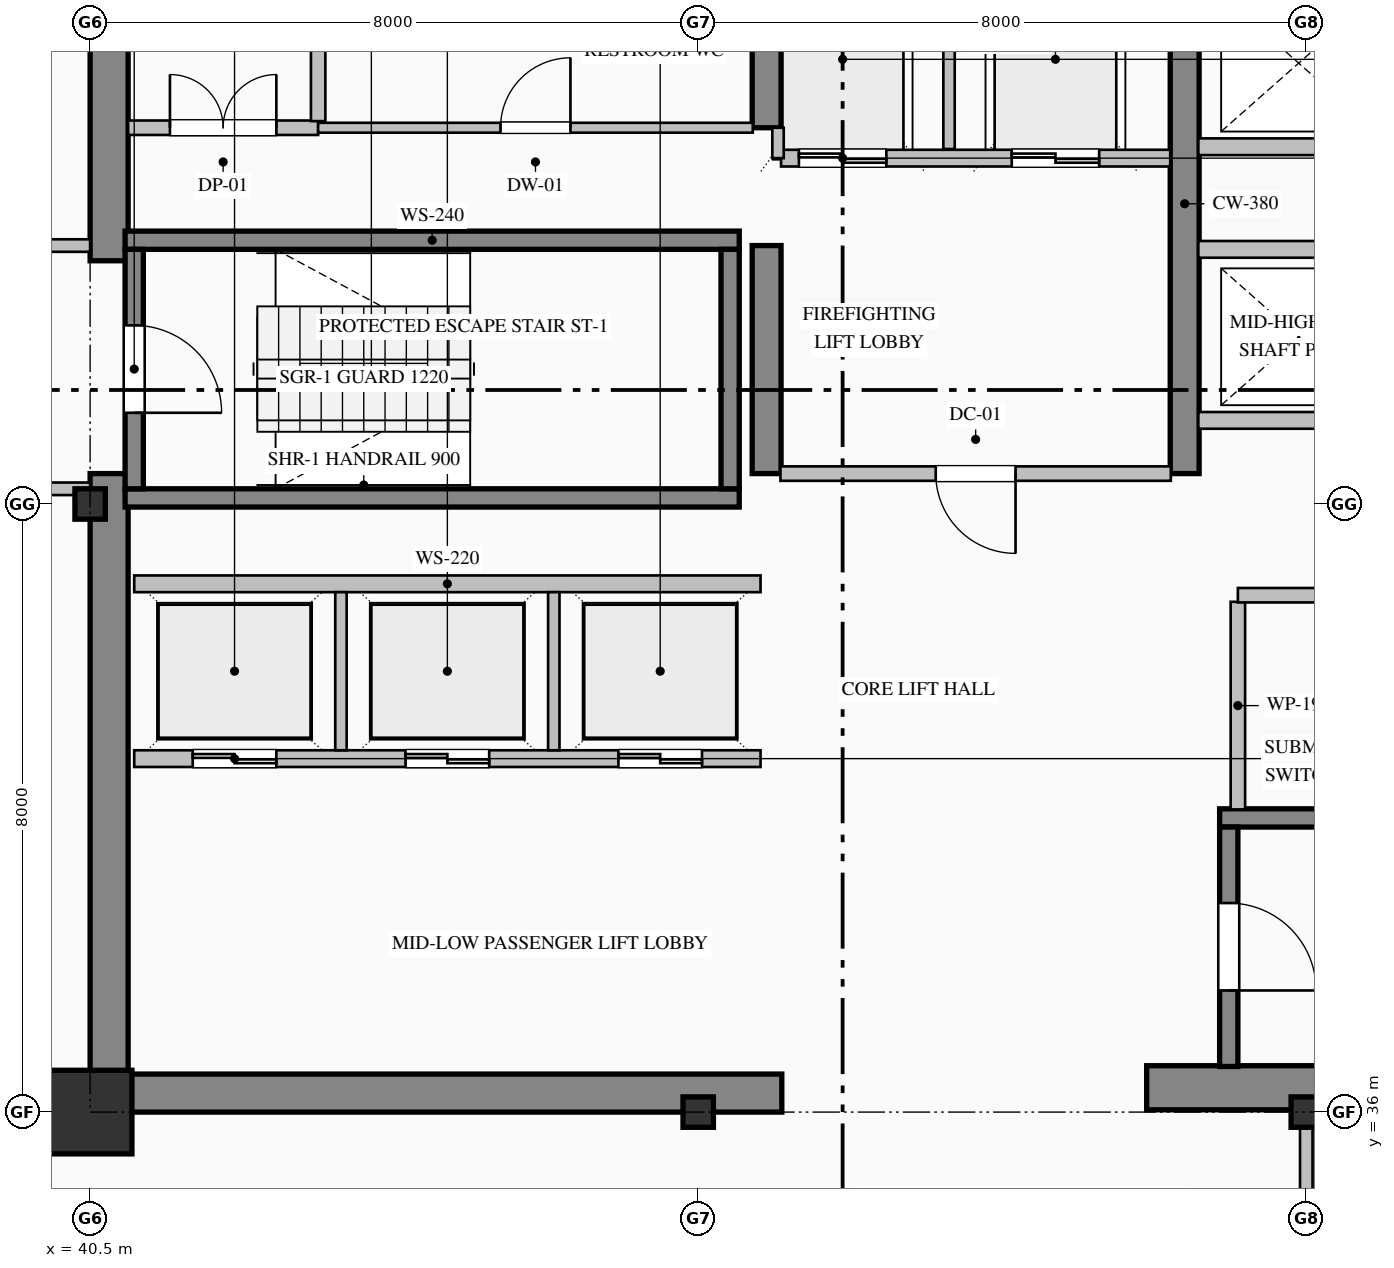
"""IFC4 building model, lengths in metres.
Left out: names, types, materials, properties, quantities, classifications, styles, units other than length and angle.
Written with IfcOpenShell. Run it as: python <this file> out.ifc"""

import sys

from ifc_helpers import new_model, si_unit, direction, frame, frame_2d, origin, origin_2d, place, context, subcontext, project, spatial, rectangle, hollow_rectangle, i_section, extrude, element, fill, save


model = new_model("IFC4")
c1 = context("Model", 3, precision=1e-05, world=origin(), true_north=direction((0.0, 1.0)))
c2 = subcontext(c1, "Body", "Model", "MODEL_VIEW")
j1 = project(units=[si_unit("LENGTHUNIT", "METRE"), si_unit("PLANEANGLEUNIT", "RADIAN")], contexts=[c1])
p1 = place(None, origin())
s1 = spatial("IfcSite", under=j1, at=p1, CompositionType="ELEMENT")
p2 = place(p1, origin())
s2 = spatial("IfcBuilding", under=s1, at=p2, CompositionType="ELEMENT")
p3 = place(p2, frame((0.0, 0.0, 147.0)))
s3 = spatial("IfcBuildingStorey", under=s2, at=p3, CompositionType="ELEMENT", Elevation=147.0)
p4 = place(p3, frame((40.75, 36.5, 0.0), z_axis=(0.0, 0.0, 1.0), x_axis=(0.0, 1.0, 0.0)))
e1 = element("IfcWall", 1, at=p4, inside=s3, PredefinedType="SHEAR", context=c2, shape_type="SweptSolid", body=[
    extrude(rectangle(XDim=7.9, YDim=0.5, at=frame_2d((3.95, 0.0))), origin(), (0.0, 0.0, 1.0), 3.765),
])
p5 = place(p3, frame((40.75, 47.2, 0.0), z_axis=(0.0, 0.0, 1.0), x_axis=(0.0, 1.0, 0.0)))
e2 = element("IfcWall", 2, at=p5, inside=s3, PredefinedType="SHEAR", context=c2, shape_type="SweptSolid", body=[
    extrude(rectangle(XDim=4.3, YDim=0.5, at=frame_2d((2.15, 0.0))), origin(), (0.0, 0.0, 1.0), 3.765),
])
p6 = place(p3, frame((40.5, 36.25, 0.0), z_axis=(0.0, 0.0, 1.0), x_axis=(1.0, 0.0, 0.0)))
e3 = element("IfcWall", 3, at=p6, inside=s3, PredefinedType="SHEAR", context=c2, shape_type="SweptSolid", body=[
    extrude(rectangle(XDim=9.1, YDim=0.5, at=frame_2d((4.55, 0.0))), origin(), (0.0, 0.0, 1.0), 3.765),
])
p7 = place(p3, frame((54.4, 36.32, 0.0), z_axis=(0.0, 0.0, 1.0), x_axis=(1.0, 0.0, 0.0)))
e4 = element("IfcWall", 4, at=p7, inside=s3, PredefinedType="SHEAR", context=c2, shape_type="SweptSolid", body=[
    extrude(rectangle(XDim=9.6, YDim=0.58, at=frame_2d((4.8, 0.0))), origin(), (0.0, 0.0, 1.0), 4.0),
])
p8 = place(p3, frame((49.4, 44.4, 0.0), z_axis=(0.0, 0.0, 1.0), x_axis=(0.0, 1.0, 0.0)))
e5 = element("IfcWall", 5, at=p8, inside=s3, PredefinedType="SHEAR", context=c2, shape_type="SweptSolid", body=[
    extrude(rectangle(XDim=3.0, YDim=0.38, at=frame_2d((1.5, 0.0))), origin(), (0.0, 0.0, 1.0), 3.765),
])
p9 = place(p3, frame((49.4, 48.95, 0.0), z_axis=(0.0, 0.0, 1.0), x_axis=(0.0, 1.0, 0.0)))
e6 = element("IfcWall", 6, at=p9, inside=s3, PredefinedType="SHEAR", context=c2, shape_type="SweptSolid", body=[
    extrude(rectangle(XDim=2.55, YDim=0.38, at=frame_2d((1.275, 0.0))), origin(), (0.0, 0.0, 1.0), 3.765),
])
p10 = place(p3, frame((54.9, 44.4, 0.0), z_axis=(0.0, 0.0, 1.0), x_axis=(0.0, 1.0, 0.0)))
e7 = element("IfcWall", 7, at=p10, inside=s3, PredefinedType="SHEAR", context=c2, shape_type="SweptSolid", body=[
    extrude(rectangle(XDim=7.1, YDim=0.38, at=frame_2d((3.55, 0.0))), origin(), (0.0, 0.0, 1.0), 3.765),
])
p11 = place(p3, frame((40.5, 36.0, 0.0), z_axis=(0.0, 0.0, 1.0), x_axis=(1.0, 0.0, 0.0)))
e8 = element("IfcColumn", 8, at=p11, inside=s3, PredefinedType="COLUMN", context=c2, shape_type="SweptSolid", body=[
    extrude(hollow_rectangle(XDim=1.1, YDim=1.1, WallThickness=0.04, at=origin_2d()), origin(), (0.0, 0.0, 1.0), 4.0),
])
for number, where, z_axis, x_axis in (
    (9, (40.5, 44.0, 0.0), (0.0, 0.0, 1.0), (1.0, 0.0, 0.0)),
    (10, (48.5, 36.0, 0.0), (0.0, 0.0, 1.0), (1.0, 0.0, 0.0)),
    (11, (56.5, 36.0, 0.0), (0.0, 0.0, 1.0), (1.0, 0.0, 0.0)),
):
    element("IfcColumn", number, at=place(p3, frame(where, z_axis=z_axis, x_axis=x_axis)), inside=s3, PredefinedType="COLUMN", context=c2, shape_type="SweptSolid", body=[
        extrude(i_section(OverallWidth=0.4, OverallDepth=0.4, WebThickness=0.013, FlangeThickness=0.021, FilletRadius=0.022, at=origin_2d()), origin(), (0.0, 0.0, 1.0), 4.0),
    ])
for number, where, z_axis, x_axis in (
    (12, (40.96, 47.47, 0.0), (0.0, 0.0, 1.0), (1.0, 0.0, 0.0)),
    (13, (49.04, 44.08, 0.0), (0.0, 0.0, 1.0), (-1.0, 0.0, 0.0)),
):
    element("IfcWall", number, at=place(p3, frame(where, z_axis=z_axis, x_axis=x_axis)), inside=s3, PredefinedType="SOLIDWALL", context=c2, shape_type="SweptSolid", body=[
        extrude(rectangle(XDim=8.08, YDim=0.24, at=frame_2d((4.04, 0.0))), origin(), (0.0, 0.0, 1.0), 4.0),
    ])
p12 = place(p3, frame((41.08, 47.35, 0.0), z_axis=(0.0, 0.0, 1.0), x_axis=(0.0, -1.0, 0.0)))
e14 = element("IfcWall", 14, at=p12, inside=s3, PredefinedType="SOLIDWALL", context=c2, shape_type="SweptSolid", body=[
    extrude(rectangle(XDim=3.15, YDim=0.24, at=frame_2d((1.575, 0.0))), origin(), (0.0, 0.0, 1.0), 4.0),
])
p13 = place(p12, frame((1.0, 0.0, 0.0)))
e15 = element("IfcOpeningElement", 15, at=p13, cuts=e14, PredefinedType="OPENING", context=c2, shape_type="SweptSolid", body=[
    extrude(rectangle(XDim=1.15, YDim=2.2, at=frame_2d((0.575, 1.1))), frame((0.0, 0.13, 0.0), z_axis=(0.0, -1.0, 0.0), x_axis=(1.0, 0.0, 0.0)), (0.0, 0.0, 1.0), 0.26),
])
p14 = place(p3, frame((48.92, 44.2, 0.0), z_axis=(0.0, 0.0, 1.0), x_axis=(0.0, 1.0, 0.0)))
e16 = element("IfcWall", 16, at=p14, inside=s3, PredefinedType="SOLIDWALL", context=c2, shape_type="SweptSolid", body=[
    extrude(rectangle(XDim=3.15, YDim=0.24, at=frame_2d((1.575, 0.0))), origin(), (0.0, 0.0, 1.0), 4.0),
])
p15 = place(p3, frame((55.36, 39.87, 0.0), z_axis=(0.0, 0.0, 1.0), x_axis=(1.0, 0.0, 0.0)))
e17 = element("IfcWall", 17, at=p15, inside=s3, PredefinedType="SOLIDWALL", context=c2, shape_type="SweptSolid", body=[
    extrude(rectangle(XDim=8.08, YDim=0.24, at=frame_2d((4.04, 0.0))), origin(), (0.0, 0.0, 1.0), 4.0),
])
p16 = place(p3, frame((55.48, 39.75, 0.0), z_axis=(0.0, 0.0, 1.0), x_axis=(0.0, -1.0, 0.0)))
e18 = element("IfcWall", 18, at=p16, inside=s3, PredefinedType="SOLIDWALL", context=c2, shape_type="SweptSolid", body=[
    extrude(rectangle(XDim=3.15, YDim=0.24, at=frame_2d((1.575, 0.0))), origin(), (0.0, 0.0, 1.0), 4.0),
])
p17 = place(p16, frame((1.0, 0.0, 0.0)))
e19 = element("IfcOpeningElement", 19, at=p17, cuts=e18, PredefinedType="OPENING", context=c2, shape_type="SweptSolid", body=[
    extrude(rectangle(XDim=1.15, YDim=2.2, at=frame_2d((0.575, 1.1))), frame((0.0, 0.13, 0.0), z_axis=(0.0, -1.0, 0.0), x_axis=(1.0, 0.0, 0.0)), (0.0, 0.0, 1.0), 0.26),
])
p18 = place(p3, frame((54.71, 48.55, 0.0), z_axis=(0.0, 0.0, 1.0), x_axis=(-1.0, 0.0, 0.0)))
e20 = element("IfcWall", 20, at=p18, inside=s3, PredefinedType="PARTITIONING", context=c2, shape_type="SweptSolid", body=[
    extrude(rectangle(XDim=5.12, YDim=0.22, at=frame_2d((2.56, 0.0))), origin(), (0.0, 0.0, 1.0), 3.765),
])
p19 = place(p18, frame((3.735, 0.0, 0.0)))
e21 = element("IfcOpeningElement", 21, at=p19, cuts=e20, PredefinedType="OPENING", context=c2, shape_type="SweptSolid", body=[
    extrude(rectangle(XDim=1.15, YDim=2.2, at=frame_2d((0.575, 1.1))), frame((0.0, 0.12, 0.0), z_axis=(0.0, -1.0, 0.0), x_axis=(1.0, 0.0, 0.0)), (0.0, 0.0, 1.0), 0.24),
])
p20 = place(p18, frame((0.935, 0.0, 0.0)))
e22 = element("IfcOpeningElement", 22, at=p20, cuts=e20, PredefinedType="OPENING", context=c2, shape_type="SweptSolid", body=[
    extrude(rectangle(XDim=1.15, YDim=2.2, at=frame_2d((0.575, 1.1))), frame((0.0, 0.12, 0.0), z_axis=(0.0, -1.0, 0.0), x_axis=(1.0, 0.0, 0.0)), (0.0, 0.0, 1.0), 0.24),
])
p21 = place(p3, frame((51.8, 48.67, 0.0), z_axis=(0.0, 0.0, 1.0), x_axis=(0.0, 1.0, 0.0)))
e23 = element("IfcWall", 23, at=p21, inside=s3, PredefinedType="PARTITIONING", context=c2, shape_type="SweptSolid", body=[
    extrude(rectangle(XDim=2.83, YDim=0.15, at=frame_2d((1.415, 0.0))), origin(), (0.0, 0.0, 1.0), 3.765),
])
p22 = place(p3, frame((49.55, 48.55, 0.0), z_axis=(0.0, 0.0, 1.0), x_axis=(0.0, 1.0, 0.0)))
e24 = element("IfcWall", 24, at=p22, inside=s3, PredefinedType="PARTITIONING", context=c2, shape_type="SweptSolid", body=[
    extrude(rectangle(XDim=0.4, YDim=0.15, at=frame_2d((0.2, 0.0))), origin(), (0.0, 0.0, 1.0), 3.765),
])
p23 = place(p3, frame((49.32, 40.65, 0.0), z_axis=(0.0, 0.0, 1.0), x_axis=(-1.0, 0.0, 0.0)))
e25 = element("IfcWall", 25, at=p23, inside=s3, PredefinedType="PARTITIONING", context=c2, shape_type="SweptSolid", body=[
    extrude(rectangle(XDim=8.24, YDim=0.22, at=frame_2d((4.12, 0.0))), origin(), (0.0, 0.0, 1.0), 3.765),
])
p24 = place(p23, frame((6.37, 0.0, 0.0)))
e26 = element("IfcOpeningElement", 26, at=p24, cuts=e25, PredefinedType="OPENING", context=c2, shape_type="SweptSolid", body=[
    extrude(rectangle(XDim=1.1, YDim=2.2, at=frame_2d((0.55, 1.1))), frame((0.0, 0.12, 0.0), z_axis=(0.0, -1.0, 0.0), x_axis=(1.0, 0.0, 0.0)), (0.0, 0.0, 1.0), 0.24),
])
p25 = place(p23, frame((3.57, 0.0, 0.0)))
e27 = element("IfcOpeningElement", 27, at=p25, cuts=e25, PredefinedType="OPENING", context=c2, shape_type="SweptSolid", body=[
    extrude(rectangle(XDim=1.1, YDim=2.2, at=frame_2d((0.55, 1.1))), frame((0.0, 0.12, 0.0), z_axis=(0.0, -1.0, 0.0), x_axis=(1.0, 0.0, 0.0)), (0.0, 0.0, 1.0), 0.24),
])
p26 = place(p23, frame((0.77, 0.0, 0.0)))
e28 = element("IfcOpeningElement", 28, at=p26, cuts=e25, PredefinedType="OPENING", context=c2, shape_type="SweptSolid", body=[
    extrude(rectangle(XDim=1.1, YDim=2.2, at=frame_2d((0.55, 1.1))), frame((0.0, 0.12, 0.0), z_axis=(0.0, -1.0, 0.0), x_axis=(1.0, 0.0, 0.0)), (0.0, 0.0, 1.0), 0.24),
])
p27 = place(p3, frame((41.08, 42.95, 0.0), z_axis=(0.0, 0.0, 1.0), x_axis=(1.0, 0.0, 0.0)))
e29 = element("IfcWall", 29, at=p27, inside=s3, PredefinedType="PARTITIONING", context=c2, shape_type="SweptSolid", body=[
    extrude(rectangle(XDim=8.24, YDim=0.22, at=frame_2d((4.12, 0.0))), origin(), (0.0, 0.0, 1.0), 3.765),
])
for number, where, z_axis, x_axis in (
    (30, (43.8, 40.76, 0.0), (0.0, 0.0, 1.0), (0.0, 1.0, 0.0)),
    (31, (46.6, 40.76, 0.0), (0.0, 0.0, 1.0), (0.0, 1.0, 0.0)),
):
    element("IfcWall", number, at=place(p3, frame(where, z_axis=z_axis, x_axis=x_axis)), inside=s3, PredefinedType="PARTITIONING", context=c2, shape_type="SweptSolid", body=[
        extrude(rectangle(XDim=2.08, YDim=0.15, at=frame_2d((1.04, 0.0))), origin(), (0.0, 0.0, 1.0), 3.765),
    ])
for number, where, z_axis, x_axis in (
    (32, (63.32, 45.1, 0.0), (0.0, 0.0, 1.0), (-1.0, 0.0, 0.0)),
    (33, (55.08, 47.35, 0.0), (0.0, 0.0, 1.0), (1.0, 0.0, 0.0)),
    (34, (63.32, 48.7, 0.0), (0.0, 0.0, 1.0), (-1.0, 0.0, 0.0)),
):
    element("IfcWall", number, at=place(p3, frame(where, z_axis=z_axis, x_axis=x_axis)), inside=s3, PredefinedType="PARTITIONING", context=c2, shape_type="SweptSolid", body=[
        extrude(rectangle(XDim=8.24, YDim=0.22, at=frame_2d((4.12, 0.0))), origin(), (0.0, 0.0, 1.0), 3.765),
    ])
p28 = place(p3, frame((37.8, 47.4, 0.0), z_axis=(0.0, 0.0, 1.0), x_axis=(1.0, 0.0, 0.0)))
e35 = element("IfcWall", 35, at=p28, inside=s3, PredefinedType="PARTITIONING", context=c2, shape_type="SweptSolid", body=[
    extrude(rectangle(XDim=2.7, YDim=0.165, at=frame_2d((1.35, 0.0))), origin(), (0.0, 0.0, 1.0), 3.765),
])
p29 = place(p28, frame((0.825, 0.0, 0.0)))
e36 = element("IfcOpeningElement", 36, at=p29, cuts=e35, PredefinedType="OPENING", context=c2, shape_type="SweptSolid", body=[
    extrude(rectangle(XDim=1.05, YDim=2.15, at=frame_2d((0.525, 1.075))), frame((0.0, 0.093, 0.0), z_axis=(0.0, -1.0, 0.0), x_axis=(1.0, 0.0, 0.0)), (0.0, 0.0, 1.0), 0.185),
])
p30 = place(p3, frame((40.5, 44.2, 0.0), z_axis=(0.0, 0.0, 1.0), x_axis=(-1.0, 0.0, 0.0)))
e37 = element("IfcWall", 37, at=p30, inside=s3, PredefinedType="PARTITIONING", context=c2, shape_type="SweptSolid", body=[
    extrude(rectangle(XDim=2.7, YDim=0.165, at=frame_2d((1.35, 0.0))), origin(), (0.0, 0.0, 1.0), 3.765),
])
p31 = place(p30, frame((0.825, 0.0, 0.0)))
e38 = element("IfcOpeningElement", 38, at=p31, cuts=e37, PredefinedType="OPENING", context=c2, shape_type="SweptSolid", body=[
    extrude(rectangle(XDim=1.05, YDim=2.15, at=frame_2d((0.525, 1.075))), frame((0.0, 0.093, 0.0), z_axis=(0.0, -1.0, 0.0), x_axis=(1.0, 0.0, 0.0)), (0.0, 0.0, 1.0), 0.185),
])
p32 = place(p3, frame((41.0, 48.95, 0.0), z_axis=(0.0, 0.0, 1.0), x_axis=(1.0, 0.0, 0.0)))
e39 = element("IfcWall", 39, at=p32, inside=s3, PredefinedType="PARTITIONING", context=c2, shape_type="SweptSolid", body=[
    extrude(rectangle(XDim=2.5, YDim=0.19, at=frame_2d((1.25, 0.0))), origin(), (0.0, 0.0, 1.0), 3.765),
])
p33 = place(p32, frame((0.55, 0.0, 0.0)))
e40 = element("IfcOpeningElement", 40, at=p33, cuts=e39, PredefinedType="OPENING", context=c2, shape_type="SweptSolid", body=[
    extrude(rectangle(XDim=1.4, YDim=2.25, at=frame_2d((0.7, 1.125))), frame((0.0, 0.105, 0.0), z_axis=(0.0, -1.0, 0.0), x_axis=(1.0, 0.0, 0.0)), (0.0, 0.0, 1.0), 0.21),
])
p34 = place(p3, frame((43.5, 48.95, 0.0), z_axis=(0.0, 0.0, 1.0), x_axis=(1.0, 0.0, 0.0)))
e41 = element("IfcWall", 41, at=p34, inside=s3, PredefinedType="PARTITIONING", context=c2, shape_type="SweptSolid", body=[
    extrude(rectangle(XDim=5.718, YDim=0.13, at=frame_2d((2.859, 0.0))), origin(), (0.0, 0.0, 1.0), 3.765),
])
p35 = place(p34, frame((2.399, 0.0, 0.0)))
e42 = element("IfcOpeningElement", 42, at=p35, cuts=e41, PredefinedType="OPENING", context=c2, shape_type="SweptSolid", body=[
    extrude(rectangle(XDim=0.92, YDim=2.15, at=frame_2d((0.46, 1.075))), frame((0.0, 0.075, 0.0), z_axis=(0.0, -1.0, 0.0), x_axis=(1.0, 0.0, 0.0)), (0.0, 0.0, 1.0), 0.15),
])
p36 = place(p3, frame((54.718, 44.4, 0.0), z_axis=(0.0, 0.0, 1.0), x_axis=(-1.0, 0.0, 0.0)))
e43 = element("IfcWall", 43, at=p36, inside=s3, PredefinedType="PARTITIONING", context=c2, shape_type="SweptSolid", body=[
    extrude(rectangle(XDim=5.136, YDim=0.19, at=frame_2d((2.568, 0.0))), origin(), (0.0, 0.0, 1.0), 3.765),
])
p37 = place(p36, frame((2.043, 0.0, 0.0)))
e44 = element("IfcOpeningElement", 44, at=p37, cuts=e43, PredefinedType="OPENING", context=c2, shape_type="SweptSolid", body=[
    extrude(rectangle(XDim=1.05, YDim=2.15, at=frame_2d((0.525, 1.075))), frame((0.0, 0.105, 0.0), z_axis=(0.0, -1.0, 0.0), x_axis=(1.0, 0.0, 0.0)), (0.0, 0.0, 1.0), 0.21),
])
p38 = place(p3, frame((55.6, 42.713, 0.0), z_axis=(0.0, 0.0, 1.0), x_axis=(0.0, -1.0, 0.0)))
e45 = element("IfcWall", 45, at=p38, inside=s3, PredefinedType="PARTITIONING", context=c2, shape_type="SweptSolid", body=[
    extrude(rectangle(XDim=2.731, YDim=0.19, at=frame_2d((1.365, 0.0))), origin(), (0.0, 0.0, 1.0), 3.765),
])
p39 = place(p3, frame((60.6, 42.8, 0.0), z_axis=(0.0, 0.0, 1.0), x_axis=(-1.0, 0.0, 0.0)))
e46 = element("IfcWall", 46, at=p39, inside=s3, PredefinedType="PARTITIONING", context=c2, shape_type="SweptSolid", body=[
    extrude(rectangle(XDim=5.0, YDim=0.19, at=frame_2d((2.5, 0.0))), origin(), (0.0, 0.0, 1.0), 3.765),
])
p40 = place(p39, frame((1.8, 0.0, 0.0)))
e47 = element("IfcOpeningElement", 47, at=p40, cuts=e46, PredefinedType="OPENING", context=c2, shape_type="SweptSolid", body=[
    extrude(rectangle(XDim=1.4, YDim=2.25, at=frame_2d((0.7, 1.125))), frame((0.0, 0.105, 0.0), z_axis=(0.0, -1.0, 0.0), x_axis=(1.0, 0.0, 0.0)), (0.0, 0.0, 1.0), 0.21),
])
p41 = place(p3, frame((43.5, 51.5, 0.0), z_axis=(0.0, 0.0, 1.0), x_axis=(0.0, -1.0, 0.0)))
e48 = element("IfcWall", 48, at=p41, inside=s3, PredefinedType="PARTITIONING", context=c2, shape_type="SweptSolid", body=[
    extrude(rectangle(XDim=2.463, YDim=0.19, at=frame_2d((1.231, 0.0))), origin(), (0.0, 0.0, 1.0), 3.765),
])
p42 = place(p3, frame((56.5, 36.0, 0.0), z_axis=(0.0, 0.0, 1.0), x_axis=(0.0, -1.0, 0.0)))
e49 = element("IfcWall", 49, at=p42, inside=s3, PredefinedType="PARTITIONING", context=c2, shape_type="SweptSolid", body=[
    extrude(rectangle(XDim=2.325, YDim=0.165, at=frame_2d((1.163, 0.0))), origin(), (0.0, 0.0, 1.0), 3.157),
])
p43 = place(p13, origin())
e50 = element("IfcDoor", 50, at=p43, inside=s3, OperationType="SINGLE_SWING_RIGHT", PredefinedType="DOOR", context=c2, shape_type="SweptSolid", body=[
    extrude(rectangle(XDim=1.15, YDim=2.2, at=frame_2d((0.575, 1.1))), frame((0.0, 0.025, 0.0), z_axis=(0.0, -1.0, 0.0), x_axis=(1.0, 0.0, 0.0)), (0.0, 0.0, 1.0), 0.05),
])
fill(e15, e50)
p44 = place(p17, origin())
e51 = element("IfcDoor", 51, at=p44, inside=s3, OperationType="SINGLE_SWING_RIGHT", PredefinedType="DOOR", context=c2, shape_type="SweptSolid", body=[
    extrude(rectangle(XDim=1.15, YDim=2.2, at=frame_2d((0.575, 1.1))), frame((0.0, 0.025, 0.0), z_axis=(0.0, -1.0, 0.0), x_axis=(1.0, 0.0, 0.0)), (0.0, 0.0, 1.0), 0.05),
])
fill(e19, e51)
p45 = place(p19, origin())
e52 = element("IfcDoor", 52, at=p45, inside=s3, OperationType="DOUBLE_DOOR_SLIDING", PredefinedType="DOOR", context=c2, shape_type="SweptSolid", body=[
    extrude(rectangle(XDim=1.15, YDim=2.2, at=frame_2d((0.575, 1.1))), frame((0.0, 0.025, 0.0), z_axis=(0.0, -1.0, 0.0), x_axis=(1.0, 0.0, 0.0)), (0.0, 0.0, 1.0), 0.05),
])
fill(e21, e52)
p46 = place(p20, origin())
e53 = element("IfcDoor", 53, at=p46, inside=s3, OperationType="DOUBLE_DOOR_SLIDING", PredefinedType="DOOR", context=c2, shape_type="SweptSolid", body=[
    extrude(rectangle(XDim=1.15, YDim=2.2, at=frame_2d((0.575, 1.1))), frame((0.0, 0.025, 0.0), z_axis=(0.0, -1.0, 0.0), x_axis=(1.0, 0.0, 0.0)), (0.0, 0.0, 1.0), 0.05),
])
fill(e22, e53)
p47 = place(p24, origin())
e54 = element("IfcDoor", 54, at=p47, inside=s3, OperationType="DOUBLE_DOOR_SLIDING", PredefinedType="DOOR", context=c2, shape_type="SweptSolid", body=[
    extrude(rectangle(XDim=1.1, YDim=2.2, at=frame_2d((0.55, 1.1))), frame((0.0, 0.025, 0.0), z_axis=(0.0, -1.0, 0.0), x_axis=(1.0, 0.0, 0.0)), (0.0, 0.0, 1.0), 0.05),
])
fill(e26, e54)
p48 = place(p25, origin())
e55 = element("IfcDoor", 55, at=p48, inside=s3, OperationType="DOUBLE_DOOR_SLIDING", PredefinedType="DOOR", context=c2, shape_type="SweptSolid", body=[
    extrude(rectangle(XDim=1.1, YDim=2.2, at=frame_2d((0.55, 1.1))), frame((0.0, 0.025, 0.0), z_axis=(0.0, -1.0, 0.0), x_axis=(1.0, 0.0, 0.0)), (0.0, 0.0, 1.0), 0.05),
])
fill(e27, e55)
p49 = place(p26, origin())
e56 = element("IfcDoor", 56, at=p49, inside=s3, OperationType="DOUBLE_DOOR_SLIDING", PredefinedType="DOOR", context=c2, shape_type="SweptSolid", body=[
    extrude(rectangle(XDim=1.1, YDim=2.2, at=frame_2d((0.55, 1.1))), frame((0.0, 0.025, 0.0), z_axis=(0.0, -1.0, 0.0), x_axis=(1.0, 0.0, 0.0)), (0.0, 0.0, 1.0), 0.05),
])
fill(e28, e56)
p50 = place(p37, origin())
e57 = element("IfcDoor", 57, at=p50, inside=s3, OperationType="SINGLE_SWING_LEFT", PredefinedType="DOOR", context=c2, shape_type="SweptSolid", body=[
    extrude(rectangle(XDim=1.05, YDim=2.15, at=frame_2d((0.525, 1.075))), frame((0.0, 0.025, 0.0), z_axis=(0.0, -1.0, 0.0), x_axis=(1.0, 0.0, 0.0)), (0.0, 0.0, 1.0), 0.05),
])
fill(e44, e57)
p51 = place(p33, origin())
e58 = element("IfcDoor", 58, at=p51, inside=s3, OperationType="DOUBLE_DOOR_SINGLE_SWING", PredefinedType="DOOR", context=c2, shape_type="SweptSolid", body=[
    extrude(rectangle(XDim=1.4, YDim=2.25, at=frame_2d((0.7, 1.125))), frame((0.0, 0.025, 0.0), z_axis=(0.0, -1.0, 0.0), x_axis=(1.0, 0.0, 0.0)), (0.0, 0.0, 1.0), 0.05),
])
fill(e40, e58)
p52 = place(p35, origin())
e59 = element("IfcDoor", 59, at=p52, inside=s3, OperationType="SINGLE_SWING_RIGHT", PredefinedType="DOOR", context=c2, shape_type="SweptSolid", body=[
    extrude(rectangle(XDim=0.92, YDim=2.15, at=frame_2d((0.46, 1.075))), frame((0.0, 0.025, 0.0), z_axis=(0.0, -1.0, 0.0), x_axis=(1.0, 0.0, 0.0)), (0.0, 0.0, 1.0), 0.05),
])
fill(e42, e59)
save(model, sys.argv[1])
